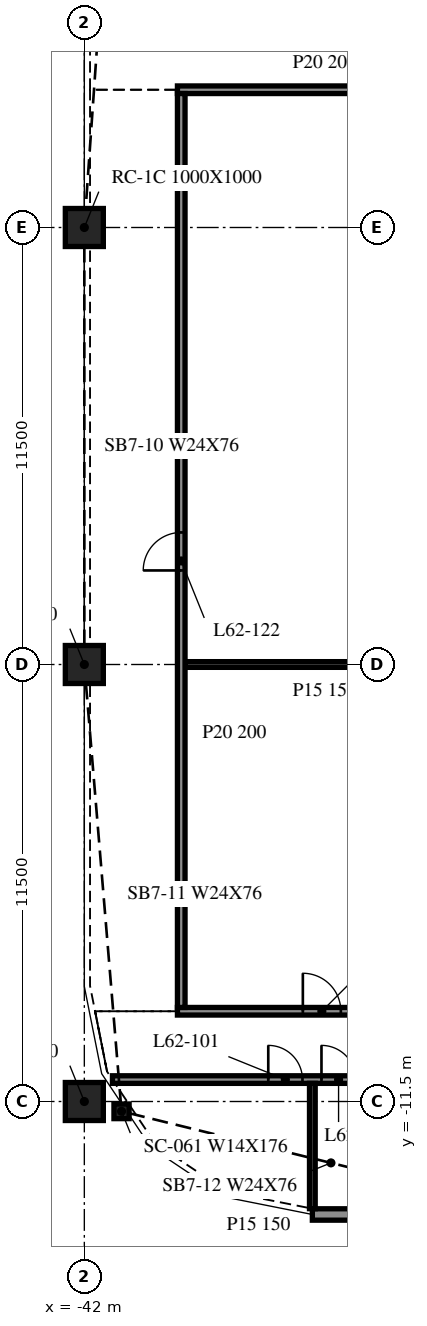
"""IFC4 building model, lengths in metres.
Left out: names, types, materials, properties, quantities, classifications, styles, units other than length and angle.
Written with IfcOpenShell. Run it as: python <this file> out.ifc"""

import sys

from ifc_helpers import new_model, si_unit, direction, frame, frame_2d, origin, origin_2d, place, context, subcontext, project, spatial, rectangle, i_section, extrude, element, fill, save


model = new_model("IFC4")
c1 = context("Model", 3, precision=1e-05, world=origin(), true_north=direction((0.0, 1.0)))
c2 = subcontext(c1, "Body", "Model", "MODEL_VIEW")
j1 = project(units=[si_unit("LENGTHUNIT", "METRE"), si_unit("PLANEANGLEUNIT", "RADIAN")], contexts=[c1])
p1 = place(None, origin())
s1 = spatial("IfcSite", under=j1, at=p1, CompositionType="ELEMENT")
p2 = place(p1, origin())
s2 = spatial("IfcBuilding", under=s1, at=p2, CompositionType="ELEMENT")
p3 = place(p2, frame((0.0, 0.0, 255.2)))
s3 = spatial("IfcBuildingStorey", under=s2, at=p3, CompositionType="ELEMENT", Elevation=255.2)
for number, where, z_axis, x_axis in (
    (1, (-42.0, -11.5, -0.34), (0.0, 0.0, 1.0), (1.0, 0.0, 0.0)),
    (2, (-42.0, 0.0, -0.34), (0.0, 0.0, 1.0), (1.0, 0.0, 0.0)),
    (3, (-42.0, 11.5, -0.34), (0.0, 0.0, 1.0), (1.0, 0.0, 0.0)),
):
    element("IfcColumn", number, at=place(p3, frame(where, z_axis=z_axis, x_axis=x_axis)), inside=s3, PredefinedType="COLUMN", context=c2, shape_type="SweptSolid", body=[
        extrude(rectangle(XDim=1.0, YDim=1.0, at=origin_2d()), origin(), (0.0, 0.0, 1.0), 3.74),
    ])
p4 = place(p3, frame((-41.021, -11.758, -0.34), z_axis=(0.0, 0.0, 1.0), x_axis=(1.0, 0.0, 0.0)))
e4 = element("IfcColumn", 4, at=p4, inside=s3, PredefinedType="COLUMN", context=c2, shape_type="SweptSolid", body=[
    extrude(i_section(OverallWidth=0.399, OverallDepth=0.386, WebThickness=0.021, FlangeThickness=0.033, at=origin_2d()), origin(), (0.0, 0.0, 1.0), 3.74),
])
p5 = place(p3, frame((-36.0, -14.473, 0.0), z_axis=(0.0, 0.0, 1.0), x_axis=(1.0, 0.0, 0.0)))
e5 = element("IfcWall", 5, at=p5, inside=s3, PredefinedType="NOTDEFINED", context=c2, shape_type="SweptSolid", body=[
    extrude(rectangle(XDim=5.99, YDim=0.3, at=frame_2d((2.995, 0.0))), origin(), (0.0, 0.0, 1.0), 3.4),
])
p6 = place(p3, frame((-41.26, -10.923, 0.0), z_axis=(0.0, 0.0, 1.0), x_axis=(1.0, 0.0, 0.0)))
e6 = element("IfcWall", 6, at=p6, inside=s3, PredefinedType="PARTITIONING", context=c2, shape_type="SweptSolid", body=[
    extrude(rectangle(XDim=10.76, YDim=0.2, at=frame_2d((5.38, 0.0))), origin(), (0.0, 0.0, 1.0), 3.4),
])
p7 = place(p6, frame((4.1, 0.0, 0.0)))
e7 = element("IfcOpeningElement", 7, at=p7, cuts=e6, PredefinedType="OPENING", context=c2, shape_type="SweptSolid", body=[
    extrude(rectangle(XDim=0.9, YDim=2.1, at=frame_2d((0.45, 1.05))), frame((0.0, 0.11, 0.0), z_axis=(0.0, -1.0, 0.0), x_axis=(1.0, 0.0, 0.0)), (0.0, 0.0, 1.0), 0.22),
])
p8 = place(p6, frame((5.5, 0.0, 0.0)))
e8 = element("IfcOpeningElement", 8, at=p8, cuts=e6, PredefinedType="OPENING", context=c2, shape_type="SweptSolid", body=[
    extrude(rectangle(XDim=0.9, YDim=2.1, at=frame_2d((0.45, 1.05))), frame((0.0, 0.11, 0.0), z_axis=(0.0, -1.0, 0.0), x_axis=(1.0, 0.0, 0.0)), (0.0, 0.0, 1.0), 0.22),
])
p9 = place(p3, frame((-39.55, -9.125, 0.0), z_axis=(0.0, 0.0, 1.0), x_axis=(1.0, 0.0, 0.0)))
e9 = element("IfcWall", 9, at=p9, inside=s3, PredefinedType="PARTITIONING", context=c2, shape_type="SweptSolid", body=[
    extrude(rectangle(XDim=7.75, YDim=0.2, at=frame_2d((3.875, 0.0))), origin(), (0.0, 0.0, 1.0), 3.4),
])
p10 = place(p9, frame((3.3, 0.0, 0.0)))
e10 = element("IfcOpeningElement", 10, at=p10, cuts=e9, PredefinedType="OPENING", context=c2, shape_type="SweptSolid", body=[
    extrude(rectangle(XDim=1.0, YDim=2.1, at=frame_2d((0.5, 1.05))), frame((0.0, 0.11, 0.0), z_axis=(0.0, -1.0, 0.0), x_axis=(1.0, 0.0, 0.0)), (0.0, 0.0, 1.0), 0.22),
])
p11 = place(p3, frame((-39.35, 0.0, 0.0), z_axis=(0.0, 0.0, 1.0), x_axis=(1.0, 0.0, 0.0)))
e11 = element("IfcWall", 11, at=p11, inside=s3, PredefinedType="PARTITIONING", context=c2, shape_type="SweptSolid", body=[
    extrude(rectangle(XDim=7.35, YDim=0.15, at=frame_2d((3.675, 0.0))), origin(), (0.0, 0.0, 1.0), 2.401),
])
p12 = place(p3, frame((-39.55, 15.125, 0.0), z_axis=(0.0, 0.0, 1.0), x_axis=(1.0, 0.0, 0.0)))
e12 = element("IfcWall", 12, at=p12, inside=s3, PredefinedType="PARTITIONING", context=c2, shape_type="SweptSolid", body=[
    extrude(rectangle(XDim=7.75, YDim=0.2, at=frame_2d((3.875, 0.0))), origin(), (0.0, 0.0, 1.0), 3.4),
])
p13 = place(p3, frame((-39.45, -9.025, 0.0), z_axis=(0.0, 0.0, 1.0), x_axis=(0.0, 1.0, 0.0)))
e13 = element("IfcWall", 13, at=p13, inside=s3, PredefinedType="PARTITIONING", context=c2, shape_type="SweptSolid", body=[
    extrude(rectangle(XDim=24.05, YDim=0.2, at=frame_2d((12.025, 0.0))), origin(), (0.0, 0.0, 1.0), 3.4),
])
p14 = place(p13, frame((11.5, 0.0, 0.0)))
e14 = element("IfcOpeningElement", 14, at=p14, cuts=e13, PredefinedType="OPENING", context=c2, shape_type="SweptSolid", body=[
    extrude(rectangle(XDim=1.0, YDim=2.1, at=frame_2d((0.5, 1.05))), frame((0.0, 0.11, 0.0), z_axis=(0.0, -1.0, 0.0), x_axis=(1.0, 0.0, 0.0)), (0.0, 0.0, 1.0), 0.22),
])
p15 = place(p3, frame((-36.0, -14.32, 0.0), z_axis=(0.0, 0.0, 1.0), x_axis=(0.0, 1.0, 0.0)))
e15 = element("IfcWall", 15, at=p15, inside=s3, PredefinedType="PARTITIONING", context=c2, shape_type="SweptSolid", body=[
    extrude(rectangle(XDim=3.297, YDim=0.15, at=frame_2d((1.648, 0.0))), origin(), (0.0, 0.0, 1.0), 3.4),
])
p16 = place(p7, origin())
e16 = element("IfcDoor", 16, at=p16, inside=s3, OperationType="SINGLE_SWING_RIGHT", PredefinedType="DOOR", context=c2, shape_type="SweptSolid", body=[
    extrude(rectangle(XDim=0.9, YDim=2.1, at=frame_2d((0.45, 1.05))), frame((0.0, 0.025, 0.0), z_axis=(0.0, -1.0, 0.0), x_axis=(1.0, 0.0, 0.0)), (0.0, 0.0, 1.0), 0.05),
])
fill(e7, e16)
p17 = place(p8, origin())
e17 = element("IfcDoor", 17, at=p17, inside=s3, OperationType="SINGLE_SWING_LEFT", PredefinedType="DOOR", context=c2, shape_type="SweptSolid", body=[
    extrude(rectangle(XDim=0.9, YDim=2.1, at=frame_2d((0.45, 1.05))), frame((0.0, 0.025, 0.0), z_axis=(0.0, -1.0, 0.0), x_axis=(1.0, 0.0, 0.0)), (0.0, 0.0, 1.0), 0.05),
])
fill(e8, e17)
p18 = place(p10, origin())
e18 = element("IfcDoor", 18, at=p18, inside=s3, OperationType="SINGLE_SWING_LEFT", PredefinedType="DOOR", context=c2, shape_type="SweptSolid", body=[
    extrude(rectangle(XDim=1.0, YDim=2.1, at=frame_2d((0.5, 1.05))), frame((0.0, 0.025, 0.0), z_axis=(0.0, -1.0, 0.0), x_axis=(1.0, 0.0, 0.0)), (0.0, 0.0, 1.0), 0.05),
])
fill(e10, e18)
p19 = place(p14, origin())
e19 = element("IfcDoor", 19, at=p19, inside=s3, OperationType="SINGLE_SWING_RIGHT", PredefinedType="DOOR", context=c2, shape_type="SweptSolid", body=[
    extrude(rectangle(XDim=1.0, YDim=2.1, at=frame_2d((0.5, 1.05))), frame((0.0, 0.025, 0.0), z_axis=(0.0, -1.0, 0.0), x_axis=(1.0, 0.0, 0.0)), (0.0, 0.0, 1.0), 0.05),
])
fill(e14, e19)
save(model, sys.argv[1])
